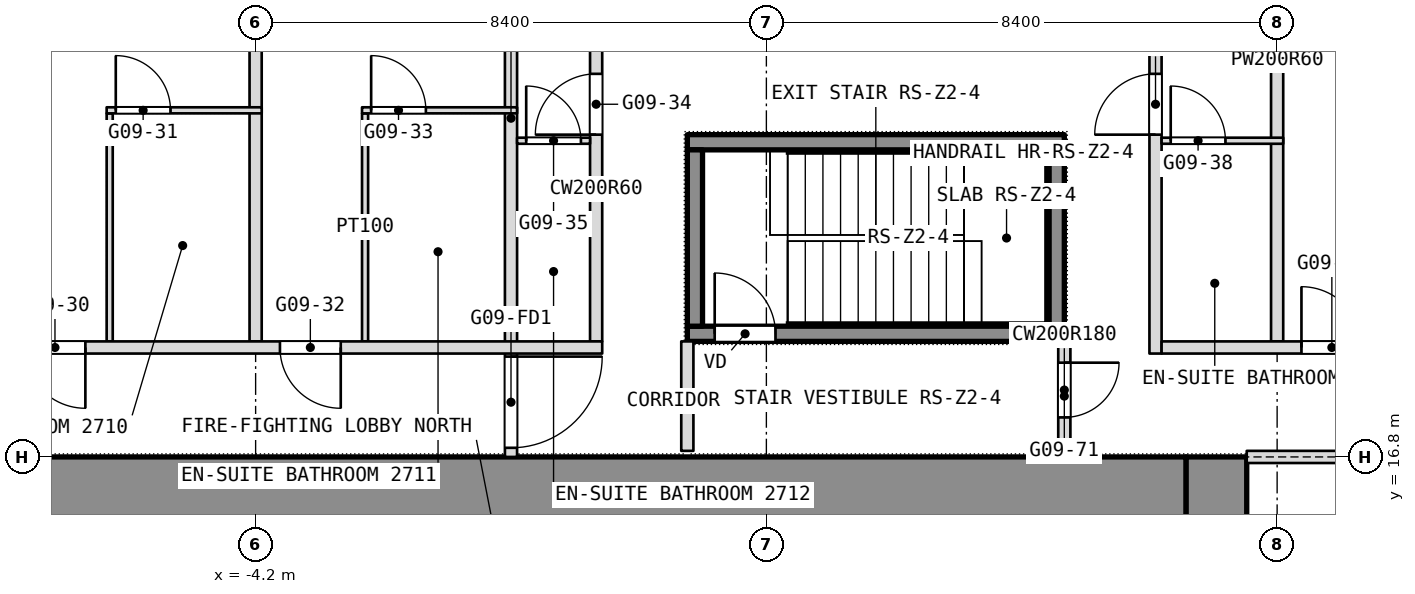
"""IFC4 building model, lengths in metres.
Left out: names, types, materials, properties, quantities, classifications, styles, units other than length and angle.
Written with IfcOpenShell. Run it as: python <this file> out.ifc"""

import sys

from ifc_helpers import new_model, si_unit, direction, frame, frame_2d, origin, place, context, subcontext, project, spatial, rectangle, extrude, element, fill, save


model = new_model("IFC4")
c1 = context("Model", 3, precision=1e-05, world=origin(), true_north=direction((0.0, 1.0)))
c2 = subcontext(c1, "Body", "Model", "MODEL_VIEW")
j1 = project(units=[si_unit("LENGTHUNIT", "METRE"), si_unit("PLANEANGLEUNIT", "RADIAN")], contexts=[c1])
p1 = place(None, origin())
s1 = spatial("IfcSite", under=j1, at=p1, CompositionType="ELEMENT")
p2 = place(p1, origin())
s2 = spatial("IfcBuilding", under=s1, at=p2, CompositionType="ELEMENT")
p3 = place(p2, frame((0.0, 0.0, 122.9)))
s3 = spatial("IfcBuildingStorey", under=s2, at=p3, CompositionType="ELEMENT", Elevation=122.9)
p4 = place(p3, frame((11.6, 0.0, 0.0), z_axis=(0.0, 0.0, 1.0), x_axis=(0.0, 1.0, 0.0)))
e1 = element("IfcWall", 1, at=p4, inside=s3, PredefinedType="SHEAR", context=c2, shape_type="SweptSolid", body=[
    extrude(rectangle(XDim=16.8, YDim=1.0, at=frame_2d((8.4, 0.0))), origin(), (0.0, 0.0, 1.0), 3.6),
])
p5 = place(p4, frame((2.3, 0.0, 0.0)))
e2 = element("IfcOpeningElement", 2, at=p5, cuts=e1, PredefinedType="OPENING", context=c2, shape_type="SweptSolid", body=[
    extrude(rectangle(XDim=1.1, YDim=2.1, at=frame_2d((0.55, 1.05))), frame((0.0, 0.5, 0.0), z_axis=(0.0, -1.0, 0.0), x_axis=(1.0, 0.0, 0.0)), (0.0, 0.0, 1.0), 1.0),
])
p6 = place(p4, frame((4.85, 0.0, 0.0)))
e3 = element("IfcOpeningElement", 3, at=p6, cuts=e1, PredefinedType="OPENING", context=c2, shape_type="SweptSolid", body=[
    extrude(rectangle(XDim=1.1, YDim=2.1, at=frame_2d((0.55, 1.05))), frame((0.0, 0.5, 0.0), z_axis=(0.0, -1.0, 0.0), x_axis=(1.0, 0.0, 0.0)), (0.0, 0.0, 1.0), 1.0),
])
p7 = place(p4, frame((6.825, 0.0, 0.0)))
e4 = element("IfcOpeningElement", 4, at=p7, cuts=e1, PredefinedType="OPENING", context=c2, shape_type="SweptSolid", body=[
    extrude(rectangle(XDim=1.2, YDim=2.1, at=frame_2d((0.6, 1.05))), frame((0.0, 0.5, 0.0), z_axis=(0.0, -1.0, 0.0), x_axis=(1.0, 0.0, 0.0)), (0.0, 0.0, 1.0), 1.0),
])
p8 = place(p4, frame((13.4, 0.0, 0.0)))
e5 = element("IfcOpeningElement", 5, at=p8, cuts=e1, PredefinedType="OPENING", context=c2, shape_type="SweptSolid", body=[
    extrude(rectangle(XDim=1.1, YDim=2.1, at=frame_2d((0.55, 1.05))), frame((0.0, 0.5, 0.0), z_axis=(0.0, -1.0, 0.0), x_axis=(1.0, 0.0, 0.0)), (0.0, 0.0, 1.0), 1.0),
])
p9 = place(p4, frame((10.85, 0.0, 0.0)))
e6 = element("IfcOpeningElement", 6, at=p9, cuts=e1, PredefinedType="OPENING", context=c2, shape_type="SweptSolid", body=[
    extrude(rectangle(XDim=1.1, YDim=2.1, at=frame_2d((0.55, 1.05))), frame((0.0, 0.5, 0.0), z_axis=(0.0, -1.0, 0.0), x_axis=(1.0, 0.0, 0.0)), (0.0, 0.0, 1.0), 1.0),
])
p10 = place(p4, frame((8.775, 0.0, 0.0)))
e7 = element("IfcOpeningElement", 7, at=p10, cuts=e1, PredefinedType="OPENING", context=c2, shape_type="SweptSolid", body=[
    extrude(rectangle(XDim=1.2, YDim=2.1, at=frame_2d((0.6, 1.05))), frame((0.0, 0.5, 0.0), z_axis=(0.0, -1.0, 0.0), x_axis=(1.0, 0.0, 0.0)), (0.0, 0.0, 1.0), 1.0),
])
p11 = place(p3, frame((-11.1, 16.3, 0.0), z_axis=(0.0, 0.0, 1.0), x_axis=(1.0, 0.0, 0.0)))
e8 = element("IfcWall", 8, at=p11, inside=s3, PredefinedType="SHEAR", context=c2, shape_type="SweptSolid", body=[
    extrude(rectangle(XDim=22.2, YDim=1.0, at=frame_2d((11.1, 0.0))), origin(), (0.0, 0.0, 1.0), 3.6),
])
p12 = place(p3, frame((12.6, 18.7, 0.0), z_axis=(0.0, 0.0, 1.0), x_axis=(0.0, 1.0, 0.0)))
e9 = element("IfcWall", 9, at=p12, inside=s3, PredefinedType="PARTITIONING", context=c2, shape_type="SweptSolid", body=[
    extrude(rectangle(XDim=9.24, YDim=0.2, at=frame_2d((4.62, 0.0))), origin(), (0.0, 0.0, 1.0), 3.34),
])
p13 = place(p3, frame((10.6, 18.5, 0.0), z_axis=(0.0, 0.0, 1.0), x_axis=(0.0, 1.0, 0.0)))
e10 = element("IfcWall", 10, at=p13, inside=s3, PredefinedType="PARTITIONING", context=c2, shape_type="SweptSolid", body=[
    extrude(rectangle(XDim=5.0, YDim=0.2, at=frame_2d((2.5, 0.0))), origin(), (0.0, 0.0, 1.0), 3.34),
])
p14 = place(p13, frame((3.6, 0.0, 0.0)))
e11 = element("IfcOpeningElement", 11, at=p14, cuts=e10, PredefinedType="OPENING", context=c2, shape_type="SweptSolid", body=[
    extrude(rectangle(XDim=1.0, YDim=2.1, at=frame_2d((0.5, 1.05))), frame((0.0, 0.1, 0.0), z_axis=(0.0, -1.0, 0.0), x_axis=(1.0, 0.0, 0.0)), (0.0, 0.0, 1.0), 0.2),
])
p15 = place(p3, frame((9.1, 16.9, 0.0), z_axis=(0.0, 0.0, 1.0), x_axis=(0.0, 1.0, 0.0)))
e12 = element("IfcWall", 12, at=p15, inside=s3, PredefinedType="PARTITIONING", context=c2, shape_type="SweptSolid", body=[
    extrude(rectangle(XDim=1.8, YDim=0.2, at=frame_2d((0.9, 0.0))), origin(), (0.0, 0.0, 1.0), 3.34),
])
p16 = place(p15, frame((0.55, 0.0, 0.0)))
e13 = element("IfcOpeningElement", 13, at=p16, cuts=e12, PredefinedType="OPENING", context=c2, shape_type="SweptSolid", body=[
    extrude(rectangle(XDim=0.9, YDim=2.1, at=frame_2d((0.45, 1.05))), frame((0.0, 0.1, 0.0), z_axis=(0.0, -1.0, 0.0), x_axis=(1.0, 0.0, 0.0)), (0.0, 0.0, 1.0), 0.2),
])
p17 = place(p3, frame((2.9, 16.9, 0.0), z_axis=(0.0, 0.0, 1.0), x_axis=(0.0, 1.0, 0.0)))
e14 = element("IfcWall", 14, at=p17, inside=s3, PredefinedType="PARTITIONING", context=c2, shape_type="SweptSolid", body=[
    extrude(rectangle(XDim=1.8, YDim=0.2, at=frame_2d((0.9, 0.0))), origin(), (0.0, 0.0, 1.0), 3.34),
])
p18 = place(p3, frame((1.4, 18.7, 0.0), z_axis=(0.0, 0.0, 1.0), x_axis=(0.0, 1.0, 0.0)))
e15 = element("IfcWall", 15, at=p18, inside=s3, PredefinedType="PARTITIONING", context=c2, shape_type="SweptSolid", body=[
    extrude(rectangle(XDim=5.0, YDim=0.2, at=frame_2d((2.5, 0.0))), origin(), (0.0, 0.0, 1.0), 3.34),
])
p19 = place(p18, frame((3.4, 0.0, 0.0)))
e16 = element("IfcOpeningElement", 16, at=p19, cuts=e15, PredefinedType="OPENING", context=c2, shape_type="SweptSolid", body=[
    extrude(rectangle(XDim=1.0, YDim=2.1, at=frame_2d((0.5, 1.05))), frame((0.0, 0.1, 0.0), z_axis=(0.0, -1.0, 0.0), x_axis=(1.0, 0.0, 0.0)), (0.0, 0.0, 1.0), 0.2),
])
p20 = place(p3, frame((0.0, 16.8, 0.0), z_axis=(0.0, 0.0, 1.0), x_axis=(0.0, 1.0, 0.0)))
e17 = element("IfcWall", 17, at=p20, inside=s3, PredefinedType="PARTITIONING", context=c2, shape_type="SweptSolid", body=[
    extrude(rectangle(XDim=11.14, YDim=0.2, at=frame_2d((5.57, 0.0))), origin(), (0.0, 0.0, 1.0), 3.34),
])
p21 = place(p20, frame((0.15, 0.0, 0.0)))
e18 = element("IfcOpeningElement", 18, at=p21, cuts=e17, PredefinedType="OPENING", context=c2, shape_type="SweptSolid", body=[
    extrude(rectangle(XDim=1.5, YDim=2.1, at=frame_2d((0.75, 1.05))), frame((0.0, 0.1, 0.0), z_axis=(0.0, -1.0, 0.0), x_axis=(1.0, 0.0, 0.0)), (0.0, 0.0, 1.0), 0.2),
])
p22 = place(p3, frame((-2.4, 18.7, 0.0), z_axis=(0.0, 0.0, 1.0), x_axis=(0.0, 1.0, 0.0)))
e19 = element("IfcWall", 19, at=p22, inside=s3, PredefinedType="PARTITIONING", context=c2, shape_type="SweptSolid", body=[
    extrude(rectangle(XDim=3.75, YDim=0.1, at=frame_2d((1.875, 0.0))), origin(), (0.0, 0.0, 1.0), 3.34),
])
p23 = place(p3, frame((-4.2, 18.7, 0.0), z_axis=(0.0, 0.0, 1.0), x_axis=(0.0, 1.0, 0.0)))
e20 = element("IfcWall", 20, at=p23, inside=s3, PredefinedType="PARTITIONING", context=c2, shape_type="SweptSolid", body=[
    extrude(rectangle(XDim=9.24, YDim=0.2, at=frame_2d((4.62, 0.0))), origin(), (0.0, 0.0, 1.0), 3.34),
])
p24 = place(p3, frame((-6.6, 18.7, 0.0), z_axis=(0.0, 0.0, 1.0), x_axis=(0.0, 1.0, 0.0)))
e21 = element("IfcWall", 21, at=p24, inside=s3, PredefinedType="PARTITIONING", context=c2, shape_type="SweptSolid", body=[
    extrude(rectangle(XDim=3.75, YDim=0.1, at=frame_2d((1.875, 0.0))), origin(), (0.0, 0.0, 1.0), 3.34),
])
p25 = place(p3, frame((-16.9, 18.6, 0.0), z_axis=(0.0, 0.0, 1.0), x_axis=(1.0, 0.0, 0.0)))
e22 = element("IfcWall", 22, at=p25, inside=s3, PredefinedType="PARTITIONING", context=c2, shape_type="SweptSolid", body=[
    extrude(rectangle(XDim=18.4, YDim=0.2, at=frame_2d((9.2, 0.0))), origin(), (0.0, 0.0, 1.0), 3.34),
])
p26 = place(p25, frame((0.5, 0.0, 0.0)))
e23 = element("IfcOpeningElement", 23, at=p26, cuts=e22, PredefinedType="OPENING", context=c2, shape_type="SweptSolid", body=[
    extrude(rectangle(XDim=1.0, YDim=2.1, at=frame_2d((0.5, 1.05))), frame((0.0, 0.1, 0.0), z_axis=(0.0, -1.0, 0.0), x_axis=(1.0, 0.0, 0.0)), (0.0, 0.0, 1.0), 0.2),
])
p27 = place(p25, frame((7.1, 0.0, 0.0)))
e24 = element("IfcOpeningElement", 24, at=p27, cuts=e22, PredefinedType="OPENING", context=c2, shape_type="SweptSolid", body=[
    extrude(rectangle(XDim=1.0, YDim=2.1, at=frame_2d((0.5, 1.05))), frame((0.0, 0.1, 0.0), z_axis=(0.0, -1.0, 0.0), x_axis=(1.0, 0.0, 0.0)), (0.0, 0.0, 1.0), 0.2),
])
p28 = place(p25, frame((8.9, 0.0, 0.0)))
e25 = element("IfcOpeningElement", 25, at=p28, cuts=e22, PredefinedType="OPENING", context=c2, shape_type="SweptSolid", body=[
    extrude(rectangle(XDim=1.0, YDim=2.1, at=frame_2d((0.5, 1.05))), frame((0.0, 0.1, 0.0), z_axis=(0.0, -1.0, 0.0), x_axis=(1.0, 0.0, 0.0)), (0.0, 0.0, 1.0), 0.2),
])
p29 = place(p25, frame((13.1, 0.0, 0.0)))
e26 = element("IfcOpeningElement", 26, at=p29, cuts=e22, PredefinedType="OPENING", context=c2, shape_type="SweptSolid", body=[
    extrude(rectangle(XDim=1.0, YDim=2.1, at=frame_2d((0.5, 1.05))), frame((0.0, 0.1, 0.0), z_axis=(0.0, -1.0, 0.0), x_axis=(1.0, 0.0, 0.0)), (0.0, 0.0, 1.0), 0.2),
])
p30 = place(p3, frame((10.7, 18.6, 0.0), z_axis=(0.0, 0.0, 1.0), x_axis=(1.0, 0.0, 0.0)))
e27 = element("IfcWall", 27, at=p30, inside=s3, PredefinedType="PARTITIONING", context=c2, shape_type="SweptSolid", body=[
    extrude(rectangle(XDim=6.2, YDim=0.2, at=frame_2d((3.1, 0.0))), origin(), (0.0, 0.0, 1.0), 3.34),
])
p31 = place(p30, frame((2.3, 0.0, 0.0)))
e28 = element("IfcOpeningElement", 28, at=p31, cuts=e27, PredefinedType="OPENING", context=c2, shape_type="SweptSolid", body=[
    extrude(rectangle(XDim=1.0, YDim=2.1, at=frame_2d((0.5, 1.05))), frame((0.0, 0.1, 0.0), z_axis=(0.0, -1.0, 0.0), x_axis=(1.0, 0.0, 0.0)), (0.0, 0.0, 1.0), 0.2),
])
p32 = place(p3, frame((0.1, 22.0, 0.0), z_axis=(0.0, 0.0, 1.0), x_axis=(1.0, 0.0, 0.0)))
e29 = element("IfcWall", 29, at=p32, inside=s3, PredefinedType="PARTITIONING", context=c2, shape_type="SweptSolid", body=[
    extrude(rectangle(XDim=1.2, YDim=0.1, at=frame_2d((0.6, 0.0))), origin(), (0.0, 0.0, 1.0), 3.34),
])
p33 = place(p32, frame((0.15, 0.0, 0.0)))
e30 = element("IfcOpeningElement", 30, at=p33, cuts=e29, PredefinedType="OPENING", context=c2, shape_type="SweptSolid", body=[
    extrude(rectangle(XDim=0.9, YDim=2.1, at=frame_2d((0.45, 1.05))), frame((0.0, 0.05, 0.0), z_axis=(0.0, -1.0, 0.0), x_axis=(1.0, 0.0, 0.0)), (0.0, 0.0, 1.0), 0.1),
])
p34 = place(p3, frame((10.7, 22.0, 0.0), z_axis=(0.0, 0.0, 1.0), x_axis=(1.0, 0.0, 0.0)))
e31 = element("IfcWall", 31, at=p34, inside=s3, PredefinedType="PARTITIONING", context=c2, shape_type="SweptSolid", body=[
    extrude(rectangle(XDim=2.0, YDim=0.1, at=frame_2d((1.0, 0.0))), origin(), (0.0, 0.0, 1.0), 3.34),
])
p35 = place(p34, frame((0.15, 0.0, 0.0)))
e32 = element("IfcOpeningElement", 32, at=p35, cuts=e31, PredefinedType="OPENING", context=c2, shape_type="SweptSolid", body=[
    extrude(rectangle(XDim=0.9, YDim=2.1, at=frame_2d((0.45, 1.05))), frame((0.0, 0.05, 0.0), z_axis=(0.0, -1.0, 0.0), x_axis=(1.0, 0.0, 0.0)), (0.0, 0.0, 1.0), 0.1),
])
p36 = place(p3, frame((-6.65, 22.5, 0.0), z_axis=(0.0, 0.0, 1.0), x_axis=(1.0, 0.0, 0.0)))
e33 = element("IfcWall", 33, at=p36, inside=s3, PredefinedType="PARTITIONING", context=c2, shape_type="SweptSolid", body=[
    extrude(rectangle(XDim=2.55, YDim=0.1, at=frame_2d((1.275, 0.0))), origin(), (0.0, 0.0, 1.0), 3.34),
])
p37 = place(p36, frame((0.15, 0.0, 0.0)))
e34 = element("IfcOpeningElement", 34, at=p37, cuts=e33, PredefinedType="OPENING", context=c2, shape_type="SweptSolid", body=[
    extrude(rectangle(XDim=0.9, YDim=2.1, at=frame_2d((0.45, 1.05))), frame((0.0, 0.05, 0.0), z_axis=(0.0, -1.0, 0.0), x_axis=(1.0, 0.0, 0.0)), (0.0, 0.0, 1.0), 0.1),
])
p38 = place(p3, frame((-2.45, 22.5, 0.0), z_axis=(0.0, 0.0, 1.0), x_axis=(1.0, 0.0, 0.0)))
e35 = element("IfcWall", 35, at=p38, inside=s3, PredefinedType="PARTITIONING", context=c2, shape_type="SweptSolid", body=[
    extrude(rectangle(XDim=2.55, YDim=0.1, at=frame_2d((1.275, 0.0))), origin(), (0.0, 0.0, 1.0), 3.34),
])
p39 = place(p38, frame((0.15, 0.0, 0.0)))
e36 = element("IfcOpeningElement", 36, at=p39, cuts=e35, PredefinedType="OPENING", context=c2, shape_type="SweptSolid", body=[
    extrude(rectangle(XDim=0.9, YDim=2.1, at=frame_2d((0.45, 1.05))), frame((0.0, 0.05, 0.0), z_axis=(0.0, -1.0, 0.0), x_axis=(1.0, 0.0, 0.0)), (0.0, 0.0, 1.0), 0.1),
])
p40 = place(p3, frame((12.1, 16.8, 0.0), z_axis=(0.0, 0.0, 1.0), x_axis=(1.0, 0.0, 0.0)))
e37 = element("IfcWall", 37, at=p40, inside=s3, PredefinedType="PARTITIONING", context=c2, shape_type="SweptSolid", body=[
    extrude(rectangle(XDim=4.6, YDim=0.2, at=frame_2d((2.3, 0.0))), origin(), (0.0, 0.0, 1.0), 2.89),
])
p41 = place(p3, frame((2.9, 18.825, 0.1), z_axis=(0.0, 0.0, 1.0), x_axis=(1.0, 0.0, 0.0)))
e38 = element("IfcWall", 38, at=p41, inside=s3, PredefinedType="SHEAR", context=c2, shape_type="SweptSolid", body=[
    extrude(rectangle(XDim=6.2, YDim=0.25, at=frame_2d((3.1, 0.0))), origin(), (0.0, 0.0, 1.0), 3.6),
])
p42 = place(p41, frame((0.45, 0.0, 0.0)))
e39 = element("IfcOpeningElement", 39, at=p42, cuts=e38, PredefinedType="OPENING", context=c2, shape_type="SweptSolid", body=[
    extrude(rectangle(XDim=1.0, YDim=2.1, at=frame_2d((0.5, 1.05))), frame((0.0, 0.125, 0.0), z_axis=(0.0, -1.0, 0.0), x_axis=(1.0, 0.0, 0.0)), (0.0, 0.0, 1.0), 0.25),
])
p43 = place(p3, frame((2.9, 21.975, 0.1), z_axis=(0.0, 0.0, 1.0), x_axis=(1.0, 0.0, 0.0)))
e40 = element("IfcWall", 40, at=p43, inside=s3, PredefinedType="SHEAR", context=c2, shape_type="SweptSolid", body=[
    extrude(rectangle(XDim=6.2, YDim=0.25, at=frame_2d((3.1, 0.0))), origin(), (0.0, 0.0, 1.0), 3.6),
])
for number, where, z_axis, x_axis in (
    (41, (3.025, 18.95, 0.1), (0.0, 0.0, 1.0), (0.0, 1.0, 0.0)),
    (42, (8.975, 18.95, 0.1), (0.0, 0.0, 1.0), (0.0, 1.0, 0.0)),
):
    element("IfcWall", number, at=place(p3, frame(where, z_axis=z_axis, x_axis=x_axis)), inside=s3, PredefinedType="SHEAR", context=c2, shape_type="SweptSolid", body=[
        extrude(rectangle(XDim=2.9, YDim=0.25, at=frame_2d((1.45, 0.0))), origin(), (0.0, 0.0, 1.0), 3.6),
    ])
p44 = place(p14, origin())
e43 = element("IfcDoor", 43, at=p44, inside=s3, OperationType="SINGLE_SWING_LEFT", PredefinedType="DOOR", context=c2, shape_type="SweptSolid", body=[
    extrude(rectangle(XDim=1.0, YDim=2.1, at=frame_2d((0.5, 1.05))), frame((0.0, 0.025, 0.0), z_axis=(0.0, -1.0, 0.0), x_axis=(1.0, 0.0, 0.0)), (0.0, 0.0, 1.0), 0.05),
])
fill(e11, e43)
p45 = place(p16, origin())
e44 = element("IfcDoor", 44, at=p45, inside=s3, OperationType="SINGLE_SWING_RIGHT", PredefinedType="DOOR", context=c2, shape_type="SweptSolid", body=[
    extrude(rectangle(XDim=0.9, YDim=2.1, at=frame_2d((0.45, 1.05))), frame((0.0, 0.025, 0.0), z_axis=(0.0, -1.0, 0.0), x_axis=(1.0, 0.0, 0.0)), (0.0, 0.0, 1.0), 0.05),
])
fill(e13, e44)
p46 = place(p19, origin())
e45 = element("IfcDoor", 45, at=p46, inside=s3, OperationType="SINGLE_SWING_RIGHT", PredefinedType="DOOR", context=c2, shape_type="SweptSolid", body=[
    extrude(rectangle(XDim=1.0, YDim=2.1, at=frame_2d((0.5, 1.05))), frame((0.0, 0.025, 0.0), z_axis=(0.0, -1.0, 0.0), x_axis=(1.0, 0.0, 0.0)), (0.0, 0.0, 1.0), 0.05),
])
fill(e16, e45)
p47 = place(p28, origin())
e46 = element("IfcDoor", 46, at=p47, inside=s3, OperationType="SINGLE_SWING_LEFT", PredefinedType="DOOR", context=c2, shape_type="SweptSolid", body=[
    extrude(rectangle(XDim=1.0, YDim=2.1, at=frame_2d((0.5, 1.05))), frame((0.0, 0.025, 0.0), z_axis=(0.0, -1.0, 0.0), x_axis=(1.0, 0.0, 0.0)), (0.0, 0.0, 1.0), 0.05),
])
fill(e25, e46)
p48 = place(p29, origin())
e47 = element("IfcDoor", 47, at=p48, inside=s3, OperationType="SINGLE_SWING_LEFT", PredefinedType="DOOR", context=c2, shape_type="SweptSolid", body=[
    extrude(rectangle(XDim=1.0, YDim=2.1, at=frame_2d((0.5, 1.05))), frame((0.0, 0.025, 0.0), z_axis=(0.0, -1.0, 0.0), x_axis=(1.0, 0.0, 0.0)), (0.0, 0.0, 1.0), 0.05),
])
fill(e26, e47)
p49 = place(p31, origin())
e48 = element("IfcDoor", 48, at=p49, inside=s3, OperationType="SINGLE_SWING_RIGHT", PredefinedType="DOOR", context=c2, shape_type="SweptSolid", body=[
    extrude(rectangle(XDim=1.0, YDim=2.1, at=frame_2d((0.5, 1.05))), frame((0.0, 0.025, 0.0), z_axis=(0.0, -1.0, 0.0), x_axis=(1.0, 0.0, 0.0)), (0.0, 0.0, 1.0), 0.05),
])
fill(e28, e48)
p50 = place(p33, origin())
e49 = element("IfcDoor", 49, at=p50, inside=s3, OperationType="SINGLE_SWING_LEFT", PredefinedType="DOOR", context=c2, shape_type="SweptSolid", body=[
    extrude(rectangle(XDim=0.9, YDim=2.1, at=frame_2d((0.45, 1.05))), frame((0.0, 0.025, 0.0), z_axis=(0.0, -1.0, 0.0), x_axis=(1.0, 0.0, 0.0)), (0.0, 0.0, 1.0), 0.05),
])
fill(e30, e49)
p51 = place(p35, origin())
e50 = element("IfcDoor", 50, at=p51, inside=s3, OperationType="SINGLE_SWING_RIGHT", PredefinedType="DOOR", context=c2, shape_type="SweptSolid", body=[
    extrude(rectangle(XDim=0.9, YDim=2.1, at=frame_2d((0.45, 1.05))), frame((0.0, 0.025, 0.0), z_axis=(0.0, -1.0, 0.0), x_axis=(1.0, 0.0, 0.0)), (0.0, 0.0, 1.0), 0.05),
])
fill(e32, e50)
p52 = place(p37, origin())
e51 = element("IfcDoor", 51, at=p52, inside=s3, OperationType="SINGLE_SWING_RIGHT", PredefinedType="DOOR", context=c2, shape_type="SweptSolid", body=[
    extrude(rectangle(XDim=0.9, YDim=2.1, at=frame_2d((0.45, 1.05))), frame((0.0, 0.025, 0.0), z_axis=(0.0, -1.0, 0.0), x_axis=(1.0, 0.0, 0.0)), (0.0, 0.0, 1.0), 0.05),
])
fill(e34, e51)
p53 = place(p39, origin())
e52 = element("IfcDoor", 52, at=p53, inside=s3, OperationType="SINGLE_SWING_RIGHT", PredefinedType="DOOR", context=c2, shape_type="SweptSolid", body=[
    extrude(rectangle(XDim=0.9, YDim=2.1, at=frame_2d((0.45, 1.05))), frame((0.0, 0.025, 0.0), z_axis=(0.0, -1.0, 0.0), x_axis=(1.0, 0.0, 0.0)), (0.0, 0.0, 1.0), 0.05),
])
fill(e36, e52)
p54 = place(p42, origin())
e53 = element("IfcDoor", 53, at=p54, inside=s3, OperationType="SINGLE_SWING_LEFT", PredefinedType="DOOR", context=c2, shape_type="SweptSolid", body=[
    extrude(rectangle(XDim=1.0, YDim=2.1, at=frame_2d((0.5, 1.05))), frame((0.0, 0.025, 0.0), z_axis=(0.0, -1.0, 0.0), x_axis=(1.0, 0.0, 0.0)), (0.0, 0.0, 1.0), 0.05),
])
fill(e39, e53)
p55 = place(p21, origin())
e54 = element("IfcDoor", 54, at=p55, inside=s3, OperationType="DOUBLE_DOOR_DOUBLE_SWING", PredefinedType="DOOR", context=c2, shape_type="SweptSolid", body=[
    extrude(rectangle(XDim=1.5, YDim=2.1, at=frame_2d((0.75, 1.05))), frame((0.0, 0.025, 0.0), z_axis=(0.0, -1.0, 0.0), x_axis=(1.0, 0.0, 0.0)), (0.0, 0.0, 1.0), 0.05),
])
fill(e18, e54)
save(model, sys.argv[1])
